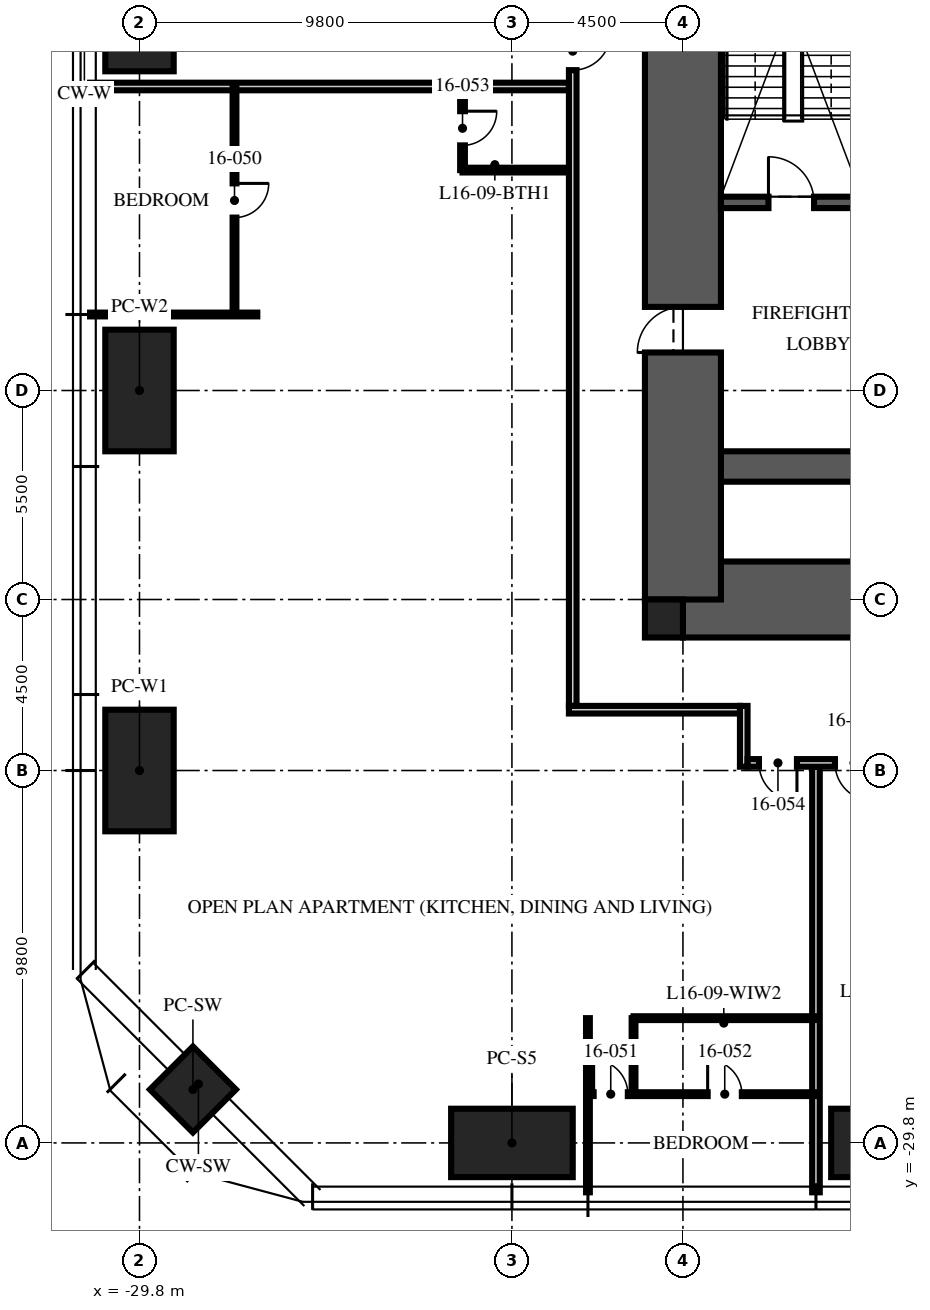
"""IFC4 building model, lengths in metres.
Left out: names, types, materials, properties, quantities, classifications, styles, units other than length and angle.
Written with IfcOpenShell. Run it as: python <this file> out.ifc"""

import sys

from ifc_helpers import new_model, si_unit, direction, frame, frame_2d, origin, origin_2d, place, context, subcontext, project, spatial, rectangle, hollow_rectangle, extrude, element, fill, save


model = new_model("IFC4")
c1 = context("Model", 3, precision=1e-05, world=origin(), true_north=direction((0.0, 1.0)))
c2 = subcontext(c1, "Body", "Model", "MODEL_VIEW")
j1 = project(units=[si_unit("LENGTHUNIT", "METRE"), si_unit("PLANEANGLEUNIT", "RADIAN")], contexts=[c1])
p1 = place(None, origin())
s1 = spatial("IfcSite", under=j1, at=p1, CompositionType="ELEMENT")
p2 = place(p1, origin())
s2 = spatial("IfcBuilding", under=s1, at=p2, CompositionType="ELEMENT")
p3 = place(p2, frame((0.0, 0.0, 66.0)))
s3 = spatial("IfcBuildingStorey", under=s2, at=p3, CompositionType="ELEMENT", Elevation=66.0)
p4 = place(p3, frame((-15.5, -15.5, -0.25), z_axis=(0.0, 0.0, 1.0), x_axis=(1.0, 0.0, 0.0)))
e1 = element("IfcWall", 1, at=p4, inside=s3, PredefinedType="SHEAR", context=c2, shape_type="SweptSolid", body=[
    extrude(rectangle(XDim=31.0, YDim=2.0, at=frame_2d((15.5, 0.0))), origin(), (0.0, 0.0, 1.0), 3.75),
])
p5 = place(p3, frame((-15.5, -12.0, -0.25), z_axis=(0.0, 0.0, 1.0), x_axis=(1.0, 0.0, 0.0)))
e2 = element("IfcWall", 2, at=p5, inside=s3, PredefinedType="SHEAR", context=c2, shape_type="SweptSolid", body=[
    extrude(rectangle(XDim=31.0, YDim=0.8, at=frame_2d((15.5, 0.0))), origin(), (0.0, 0.0, 1.0), 3.75),
])
p6 = place(p3, frame((-15.5, -15.5, -0.25), z_axis=(0.0, 0.0, 1.0), x_axis=(0.0, 1.0, 0.0)))
e3 = element("IfcWall", 3, at=p6, inside=s3, PredefinedType="SHEAR", context=c2, shape_type="SweptSolid", body=[
    extrude(rectangle(XDim=31.0, YDim=2.0, at=frame_2d((15.5, 0.0))), origin(), (0.0, 0.0, 1.0), 3.75),
])
p7 = place(p6, frame((6.5, 0.0, 0.25)))
e4 = element("IfcOpeningElement", 4, at=p7, cuts=e3, PredefinedType="OPENING", context=c2, shape_type="SweptSolid", body=[
    extrude(rectangle(XDim=1.2, YDim=2.1, at=frame_2d((0.6, 1.05))), frame((0.0, 1.01, 0.0), z_axis=(0.0, -1.0, 0.0), x_axis=(1.0, 0.0, 0.0)), (0.0, 0.0, 1.0), 2.02),
])
p8 = place(p6, frame((23.0, 0.0, 0.25)))
e5 = element("IfcOpeningElement", 5, at=p8, cuts=e3, PredefinedType="OPENING", context=c2, shape_type="SweptSolid", body=[
    extrude(rectangle(XDim=1.8, YDim=2.1, at=frame_2d((0.9, 1.05))), frame((0.0, 1.01, 0.0), z_axis=(0.0, -1.0, 0.0), x_axis=(1.0, 0.0, 0.0)), (0.0, 0.0, 1.0), 2.02),
])
p9 = place(p3, frame((-16.0, -16.0, -0.25), z_axis=(0.0, 0.0, 1.0), x_axis=(1.0, 0.0, 0.0)))
e6 = element("IfcColumn", 6, at=p9, inside=s3, PredefinedType="COLUMN", context=c2, shape_type="SweptSolid", body=[
    extrude(rectangle(XDim=1.0, YDim=1.0, at=origin_2d()), origin(), (0.0, 0.0, 1.0), 3.75),
])
for number, where, z_axis, x_axis in (
    (7, (-10.0, -29.8, 0.0), (0.0, 0.0, 1.0), (1.0, 0.0, 0.0)),
    (8, (-20.0, -29.8, 0.0), (0.0, 0.0, 1.0), (1.0, 0.0, 0.0)),
    (9, (-29.8, -20.0, 0.0), (0.0, 0.0, 1.0), (0.0, 1.0, 0.0)),
    (10, (-29.8, -10.0, 0.0), (0.0, 0.0, 1.0), (0.0, 1.0, 0.0)),
    (11, (-29.8, 0.0, 0.0), (0.0, 0.0, 1.0), (0.0, 1.0, 0.0)),
):
    element("IfcColumn", number, at=place(p3, frame(where, z_axis=z_axis, x_axis=x_axis)), inside=s3, PredefinedType="COLUMN", context=c2, shape_type="SweptSolid", body=[
        extrude(hollow_rectangle(XDim=3.2, YDim=1.8, WallThickness=0.2, at=origin_2d()), origin(), (0.0, 0.0, 1.0), 3.75),
    ])
p10 = place(p3, frame((-28.394, -28.394, 0.0), z_axis=(0.0, 0.0, 1.0), x_axis=(0.707106781187, -0.707106781187, 0.0)))
e12 = element("IfcColumn", 12, at=p10, inside=s3, PredefinedType="COLUMN", context=c2, shape_type="SweptSolid", body=[
    extrude(hollow_rectangle(XDim=1.6, YDim=1.6, WallThickness=0.1, at=origin_2d()), origin(), (0.0, 0.0, 1.0), 3.75),
])
p11 = place(p3, frame((-14.5, -5.05, 0.0), z_axis=(0.0, 0.0, 1.0), x_axis=(1.0, 0.0, 0.0)))
e13 = element("IfcWall", 13, at=p11, inside=s3, PredefinedType="SOLIDWALL", context=c2, shape_type="SweptSolid", body=[
    extrude(rectangle(XDim=5.7, YDim=0.3, at=frame_2d((2.85, 0.0))), origin(), (0.0, 0.0, 1.0), 3.5),
])
p12 = place(p11, frame((1.25, 0.0, 0.0)))
e14 = element("IfcOpeningElement", 14, at=p12, cuts=e13, PredefinedType="OPENING", context=c2, shape_type="SweptSolid", body=[
    extrude(rectangle(XDim=1.2, YDim=2.1, at=frame_2d((0.6, 1.05))), frame((0.0, 0.16, 0.0), z_axis=(0.0, -1.0, 0.0), x_axis=(1.0, 0.0, 0.0)), (0.0, 0.0, 1.0), 0.32),
])
p13 = place(p3, frame((-18.5, -2.0, 0.0), z_axis=(0.0, 0.0, 1.0), x_axis=(-1.0, 0.0, 0.0)))
e15 = element("IfcWall", 15, at=p13, inside=s3, PredefinedType="PARTITIONING", context=c2, shape_type="SweptSolid", body=[
    extrude(rectangle(XDim=12.6, YDim=0.2, at=frame_2d((6.3, 0.0))), origin(), (0.0, 0.0, 1.0), 2.71),
])
p14 = place(p3, frame((-26.7, -8.0, 0.0), z_axis=(0.0, 0.0, 1.0), x_axis=(-1.0, 0.0, 0.0)))
e16 = element("IfcWall", 16, at=p14, inside=s3, PredefinedType="PARTITIONING", context=c2, shape_type="SweptSolid", body=[
    extrude(rectangle(XDim=4.4, YDim=0.1, at=frame_2d((2.2, 0.0))), origin(), (0.0, 0.0, 1.0), 2.71),
])
p15 = place(p3, frame((-18.0, -26.517, 0.0), z_axis=(0.0, 0.0, 1.0), x_axis=(0.0, -1.0, 0.0)))
e17 = element("IfcWall", 17, at=p15, inside=s3, PredefinedType="PARTITIONING", context=c2, shape_type="SweptSolid", body=[
    extrude(rectangle(XDim=4.583, YDim=0.1, at=frame_2d((2.292, 0.0))), origin(), (0.0, 0.0, 1.0), 2.71),
])
p16 = place(p3, frame((-12.0, -19.9, 0.0), z_axis=(0.0, 0.0, 1.0), x_axis=(0.0, -1.0, 0.0)))
e18 = element("IfcWall", 18, at=p16, inside=s3, PredefinedType="PARTITIONING", context=c2, shape_type="SweptSolid", body=[
    extrude(rectangle(XDim=11.2, YDim=0.2, at=frame_2d((5.6, 0.0))), origin(), (0.0, 0.0, 1.0), 2.71),
])
p17 = place(p3, frame((-27.3, -2.0, 0.0), z_axis=(0.0, 0.0, 1.0), x_axis=(0.0, -1.0, 0.0)))
e19 = element("IfcWall", 19, at=p17, inside=s3, PredefinedType="PARTITIONING", context=c2, shape_type="SweptSolid", body=[
    extrude(rectangle(XDim=6.0, YDim=0.1, at=frame_2d((3.0, 0.0))), origin(), (0.0, 0.0, 1.0), 2.61),
])
p18 = place(p17, frame((2.55, 0.0, 0.0)))
e20 = element("IfcOpeningElement", 20, at=p18, cuts=e19, PredefinedType="OPENING", context=c2, shape_type="SweptSolid", body=[
    extrude(rectangle(XDim=0.9, YDim=2.1, at=frame_2d((0.45, 1.05))), frame((0.0, 0.06, 0.0), z_axis=(0.0, -1.0, 0.0), x_axis=(1.0, 0.0, 0.0)), (0.0, 0.0, 1.0), 0.12),
])
p19 = place(p3, frame((-18.0, -28.517, 0.0), z_axis=(0.0, 0.0, 1.0), x_axis=(1.0, 0.0, 0.0)))
e21 = element("IfcWall", 21, at=p19, inside=s3, PredefinedType="PARTITIONING", context=c2, shape_type="SweptSolid", body=[
    extrude(rectangle(XDim=6.0, YDim=0.1, at=frame_2d((3.0, 0.0))), origin(), (0.0, 0.0, 1.0), 2.61),
])
p20 = place(p19, frame((0.15, 0.0, 0.0)))
e22 = element("IfcOpeningElement", 22, at=p20, cuts=e21, PredefinedType="OPENING", context=c2, shape_type="SweptSolid", body=[
    extrude(rectangle(XDim=0.9, YDim=2.1, at=frame_2d((0.45, 1.05))), frame((0.0, 0.06, 0.0), z_axis=(0.0, -1.0, 0.0), x_axis=(1.0, 0.0, 0.0)), (0.0, 0.0, 1.0), 0.12),
])
p21 = place(p19, frame((3.15, 0.0, 0.0)))
e23 = element("IfcOpeningElement", 23, at=p21, cuts=e21, PredefinedType="OPENING", context=c2, shape_type="SweptSolid", body=[
    extrude(rectangle(XDim=0.9, YDim=2.1, at=frame_2d((0.45, 1.05))), frame((0.0, 0.06, 0.0), z_axis=(0.0, -1.0, 0.0), x_axis=(1.0, 0.0, 0.0)), (0.0, 0.0, 1.0), 0.12),
])
p22 = place(p3, frame((-16.8, -26.517, 0.0), z_axis=(0.0, 0.0, 1.0), x_axis=(0.0, -1.0, 0.0)))
e24 = element("IfcWall", 24, at=p22, inside=s3, PredefinedType="PARTITIONING", context=c2, shape_type="SweptSolid", body=[
    extrude(rectangle(XDim=2.0, YDim=0.1, at=frame_2d((1.0, 0.0))), origin(), (0.0, 0.0, 1.0), 3.5),
])
p23 = place(p3, frame((-16.8, -26.517, 0.0), z_axis=(0.0, 0.0, 1.0), x_axis=(1.0, 0.0, 0.0)))
e25 = element("IfcWall", 25, at=p23, inside=s3, PredefinedType="PARTITIONING", context=c2, shape_type="SweptSolid", body=[
    extrude(rectangle(XDim=4.8, YDim=0.1, at=frame_2d((2.4, 0.0))), origin(), (0.0, 0.0, 1.0), 2.61),
])
p24 = place(p3, frame((-21.3, -2.0, 0.0), z_axis=(0.0, 0.0, 1.0), x_axis=(0.0, -1.0, 0.0)))
e26 = element("IfcWall", 26, at=p24, inside=s3, PredefinedType="PARTITIONING", context=c2, shape_type="SweptSolid", body=[
    extrude(rectangle(XDim=2.2, YDim=0.125, at=frame_2d((1.1, 0.0))), origin(), (0.0, 0.0, 1.0), 3.5),
])
p25 = place(p24, frame((0.65, 0.0, 0.0)))
e27 = element("IfcOpeningElement", 27, at=p25, cuts=e26, PredefinedType="OPENING", context=c2, shape_type="SweptSolid", body=[
    extrude(rectangle(XDim=0.9, YDim=2.1, at=frame_2d((0.45, 1.05))), frame((0.0, 0.073, 0.0), z_axis=(0.0, -1.0, 0.0), x_axis=(1.0, 0.0, 0.0)), (0.0, 0.0, 1.0), 0.145),
])
p26 = place(p3, frame((-18.5, -4.2, 0.0), z_axis=(0.0, 0.0, 1.0), x_axis=(-1.0, 0.0, 0.0)))
e28 = element("IfcWall", 28, at=p26, inside=s3, PredefinedType="PARTITIONING", context=c2, shape_type="SweptSolid", body=[
    extrude(rectangle(XDim=2.8, YDim=0.125, at=frame_2d((1.4, 0.0))), origin(), (0.0, 0.0, 1.0), 3.5),
])
p27 = place(p3, frame((-18.4, 18.3, 0.0), z_axis=(0.0, 0.0, 1.0), x_axis=(0.0, -1.0, 0.0)))
e29 = element("IfcWall", 29, at=p27, inside=s3, PredefinedType="PARTITIONING", context=c2, shape_type="SweptSolid", body=[
    extrude(rectangle(XDim=36.6, YDim=0.2, at=frame_2d((18.3, 0.0))), origin(), (0.0, 0.0, 1.0), 2.3),
])
p28 = place(p27, frame((8.57, 0.0, 0.0)))
e30 = element("IfcOpeningElement", 30, at=p28, cuts=e29, PredefinedType="OPENING", context=c2, shape_type="SweptSolid", body=[
    extrude(rectangle(XDim=1.0, YDim=2.2, at=frame_2d((0.5, 1.1))), frame((0.0, 0.11, 0.0), z_axis=(0.0, -1.0, 0.0), x_axis=(1.0, 0.0, 0.0)), (0.0, 0.0, 1.0), 0.22),
])
p29 = place(p27, frame((14.87, 0.0, 0.0)))
e31 = element("IfcOpeningElement", 31, at=p29, cuts=e29, PredefinedType="OPENING", context=c2, shape_type="SweptSolid", body=[
    extrude(rectangle(XDim=1.0, YDim=2.2, at=frame_2d((0.5, 1.1))), frame((0.0, 0.11, 0.0), z_axis=(0.0, -1.0, 0.0), x_axis=(1.0, 0.0, 0.0)), (0.0, 0.0, 1.0), 0.22),
])
p30 = place(p27, frame((18.87, 0.0, 0.0)))
e32 = element("IfcOpeningElement", 32, at=p30, cuts=e29, PredefinedType="OPENING", context=c2, shape_type="SweptSolid", body=[
    extrude(rectangle(XDim=1.0, YDim=2.2, at=frame_2d((0.5, 1.1))), frame((0.0, 0.11, 0.0), z_axis=(0.0, -1.0, 0.0), x_axis=(1.0, 0.0, 0.0)), (0.0, 0.0, 1.0), 0.22),
])
p31 = place(p3, frame((-13.9, -18.3, 0.0), z_axis=(0.0, 0.0, 1.0), x_axis=(0.0, -1.0, 0.0)))
e33 = element("IfcWall", 33, at=p31, inside=s3, PredefinedType="PARTITIONING", context=c2, shape_type="SweptSolid", body=[
    extrude(rectangle(XDim=1.6, YDim=0.2, at=frame_2d((0.8, 0.0))), origin(), (0.0, 0.0, 1.0), 3.5),
])
p32 = place(p3, frame((-10.2, -19.8, 0.0), z_axis=(0.0, 0.0, 1.0), x_axis=(-1.0, 0.0, 0.0)))
e34 = element("IfcWall", 34, at=p32, inside=s3, PredefinedType="PARTITIONING", context=c2, shape_type="SweptSolid", body=[
    extrude(rectangle(XDim=3.6, YDim=0.2, at=frame_2d((1.8, 0.0))), origin(), (0.0, 0.0, 1.0), 3.5),
])
p33 = place(p32, frame((2.3, 0.0, 0.0)))
e35 = element("IfcOpeningElement", 35, at=p33, cuts=e34, PredefinedType="OPENING", context=c2, shape_type="SweptSolid", body=[
    extrude(rectangle(XDim=1.0, YDim=2.2, at=frame_2d((0.5, 1.1))), frame((0.0, 0.11, 0.0), z_axis=(0.0, -1.0, 0.0), x_axis=(1.0, 0.0, 0.0)), (0.0, 0.0, 1.0), 0.22),
])
p34 = place(p32, frame((0.3, 0.0, 0.0)))
e36 = element("IfcOpeningElement", 36, at=p34, cuts=e34, PredefinedType="OPENING", context=c2, shape_type="SweptSolid", body=[
    extrude(rectangle(XDim=1.0, YDim=2.2, at=frame_2d((0.5, 1.1))), frame((0.0, 0.11, 0.0), z_axis=(0.0, -1.0, 0.0), x_axis=(1.0, 0.0, 0.0)), (0.0, 0.0, 1.0), 0.22),
])
p35 = place(p3, frame((-14.0, -18.4, 0.0), z_axis=(0.0, 0.0, 1.0), x_axis=(-1.0, 0.0, 0.0)))
e37 = element("IfcWall", 37, at=p35, inside=s3, PredefinedType="PARTITIONING", context=c2, shape_type="SweptSolid", body=[
    extrude(rectangle(XDim=4.5, YDim=0.2, at=frame_2d((2.25, 0.0))), origin(), (0.0, 0.0, 1.0), 2.3),
])
p36 = place(p12, origin())
e38 = element("IfcDoor", 38, at=p36, inside=s3, OperationType="SINGLE_SWING_LEFT", PredefinedType="DOOR", context=c2, shape_type="SweptSolid", body=[
    extrude(rectangle(XDim=1.2, YDim=2.1, at=frame_2d((0.6, 1.05))), frame((0.0, 0.025, 0.0), z_axis=(0.0, -1.0, 0.0), x_axis=(1.0, 0.0, 0.0)), (0.0, 0.0, 1.0), 0.05),
])
fill(e14, e38)
p37 = place(p7, origin())
e39 = element("IfcDoor", 39, at=p37, inside=s3, OperationType="SINGLE_SWING_LEFT", PredefinedType="DOOR", context=c2, shape_type="SweptSolid", body=[
    extrude(rectangle(XDim=1.2, YDim=2.1, at=frame_2d((0.6, 1.05))), frame((0.0, 0.025, 0.0), z_axis=(0.0, -1.0, 0.0), x_axis=(1.0, 0.0, 0.0)), (0.0, 0.0, 1.0), 0.05),
])
fill(e4, e39)
p38 = place(p30, origin())
e40 = element("IfcDoor", 40, at=p38, inside=s3, OperationType="SINGLE_SWING_LEFT", PredefinedType="DOOR", context=c2, shape_type="SweptSolid", body=[
    extrude(rectangle(XDim=1.0, YDim=2.2, at=frame_2d((0.5, 1.1))), frame((0.0, 0.025, 0.0), z_axis=(0.0, -1.0, 0.0), x_axis=(1.0, 0.0, 0.0)), (0.0, 0.0, 1.0), 0.05),
])
fill(e32, e40)
p39 = place(p18, origin())
e41 = element("IfcDoor", 41, at=p39, inside=s3, OperationType="SINGLE_SWING_LEFT", PredefinedType="DOOR", context=c2, shape_type="SweptSolid", body=[
    extrude(rectangle(XDim=0.9, YDim=2.1, at=frame_2d((0.45, 1.05))), frame((0.0, 0.025, 0.0), z_axis=(0.0, -1.0, 0.0), x_axis=(1.0, 0.0, 0.0)), (0.0, 0.0, 1.0), 0.05),
])
fill(e20, e41)
p40 = place(p20, origin())
e42 = element("IfcDoor", 42, at=p40, inside=s3, OperationType="SINGLE_SWING_LEFT", PredefinedType="DOOR", context=c2, shape_type="SweptSolid", body=[
    extrude(rectangle(XDim=0.9, YDim=2.1, at=frame_2d((0.45, 1.05))), frame((0.0, 0.025, 0.0), z_axis=(0.0, -1.0, 0.0), x_axis=(1.0, 0.0, 0.0)), (0.0, 0.0, 1.0), 0.05),
])
fill(e22, e42)
p41 = place(p21, origin())
e43 = element("IfcDoor", 43, at=p41, inside=s3, OperationType="SINGLE_SWING_LEFT", PredefinedType="DOOR", context=c2, shape_type="SweptSolid", body=[
    extrude(rectangle(XDim=0.9, YDim=2.1, at=frame_2d((0.45, 1.05))), frame((0.0, 0.025, 0.0), z_axis=(0.0, -1.0, 0.0), x_axis=(1.0, 0.0, 0.0)), (0.0, 0.0, 1.0), 0.05),
])
fill(e23, e43)
p42 = place(p25, origin())
e44 = element("IfcDoor", 44, at=p42, inside=s3, OperationType="SINGLE_SWING_LEFT", PredefinedType="DOOR", context=c2, shape_type="SweptSolid", body=[
    extrude(rectangle(XDim=0.9, YDim=2.1, at=frame_2d((0.45, 1.05))), frame((0.0, 0.025, 0.0), z_axis=(0.0, -1.0, 0.0), x_axis=(1.0, 0.0, 0.0)), (0.0, 0.0, 1.0), 0.05),
])
fill(e27, e44)
p43 = place(p33, origin())
e45 = element("IfcDoor", 45, at=p43, inside=s3, OperationType="SINGLE_SWING_LEFT", PredefinedType="DOOR", context=c2, shape_type="SweptSolid", body=[
    extrude(rectangle(XDim=1.0, YDim=2.2, at=frame_2d((0.5, 1.1))), frame((0.0, 0.025, 0.0), z_axis=(0.0, -1.0, 0.0), x_axis=(1.0, 0.0, 0.0)), (0.0, 0.0, 1.0), 0.05),
])
fill(e35, e45)
p44 = place(p34, origin())
e46 = element("IfcDoor", 46, at=p44, inside=s3, OperationType="SINGLE_SWING_LEFT", PredefinedType="DOOR", context=c2, shape_type="SweptSolid", body=[
    extrude(rectangle(XDim=1.0, YDim=2.2, at=frame_2d((0.5, 1.1))), frame((0.0, 0.025, 0.0), z_axis=(0.0, -1.0, 0.0), x_axis=(1.0, 0.0, 0.0)), (0.0, 0.0, 1.0), 0.05),
])
fill(e36, e46)
save(model, sys.argv[1])
